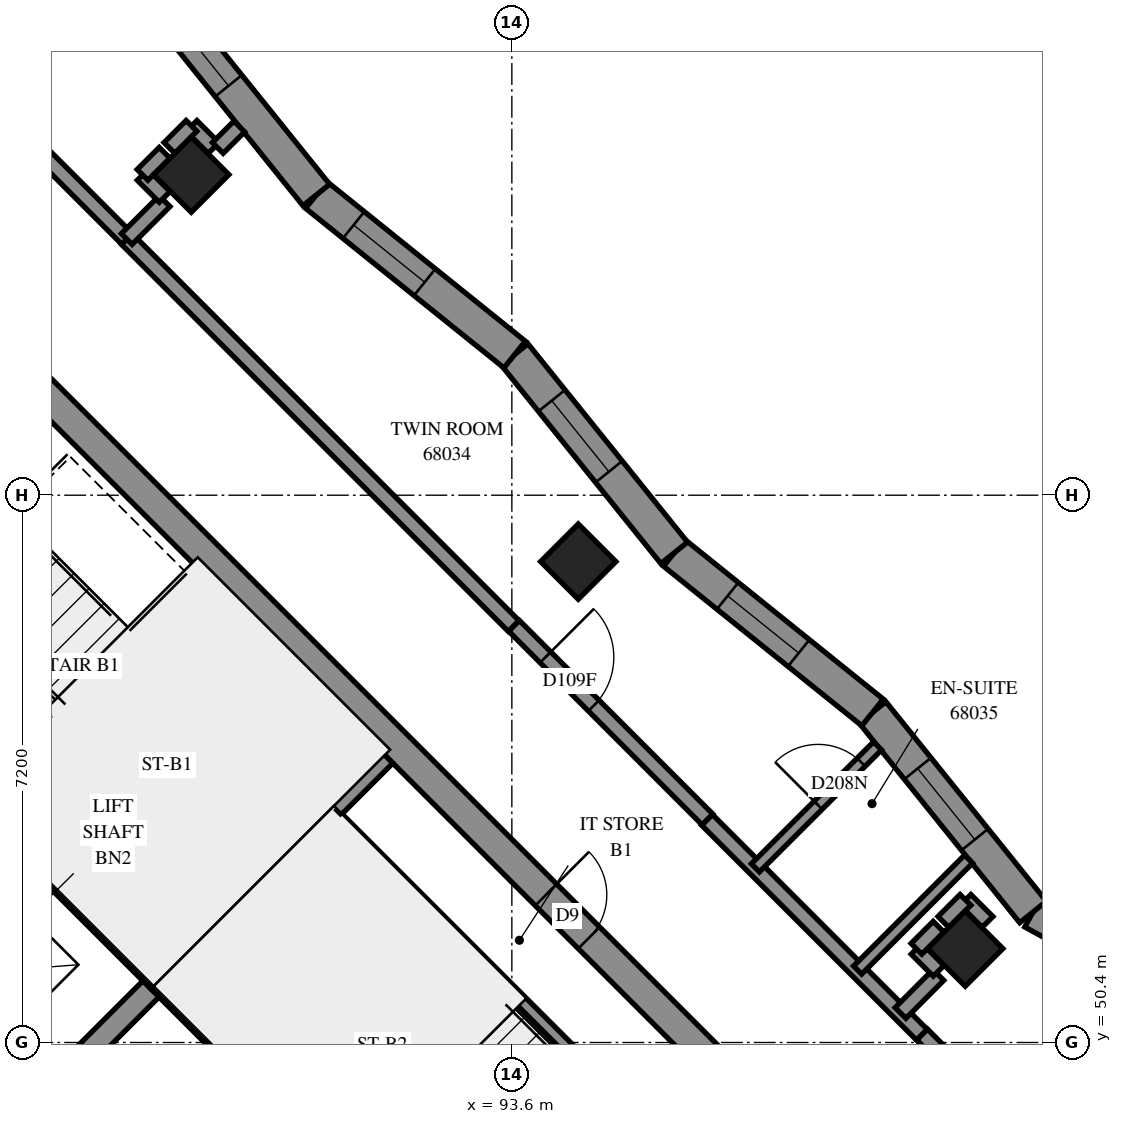
"""IFC4 building model, lengths in metres.
Left out: names, types, materials, properties, quantities, classifications, styles, units other than length and angle.
Written with IfcOpenShell. Run it as: python <this file> out.ifc"""

import sys

from ifc_helpers import new_model, si_unit, direction, frame, frame_2d, origin, origin_2d, place, context, subcontext, project, spatial, polyline, rectangle, outline, extrude, element, fill, save


model = new_model("IFC4")
c1 = context("Model", 3, precision=1e-05, world=origin(), true_north=direction((0.0, 1.0)))
c2 = subcontext(c1, "Body", "Model", "MODEL_VIEW")
j1 = project(units=[si_unit("LENGTHUNIT", "METRE"), si_unit("PLANEANGLEUNIT", "RADIAN")], contexts=[c1])
p1 = place(None, origin())
s1 = spatial("IfcSite", under=j1, at=p1, CompositionType="ELEMENT")
p2 = place(p1, origin())
s2 = spatial("IfcBuilding", under=s1, at=p2, CompositionType="ELEMENT")
p3 = place(p2, frame((0.0, 0.0, 250.6)))
s3 = spatial("IfcBuildingStorey", under=s2, at=p3, CompositionType="ELEMENT", Elevation=250.6)
for number, where, z_axis, x_axis in (
    (1, (89.382, 61.818, 0.0), (0.0, 0.0, 1.0), (0.707, -0.707, 0.0)),
    (2, (94.474, 56.727, 0.0), (0.0, 0.0, 1.0), (0.707, -0.707, 0.0)),
    (3, (99.565, 51.635, 0.0), (0.0, 0.0, 1.0), (0.707, -0.707, 0.0)),
):
    element("IfcColumn", number, at=place(p3, frame(where, z_axis=z_axis, x_axis=x_axis)), inside=s3, PredefinedType="COLUMN", context=c2, shape_type="SweptSolid", body=[
        extrude(rectangle(XDim=0.7, YDim=0.7, at=origin_2d()), origin(), (0.0, 0.0, 1.0), 3.1),
    ])
p4 = place(p3, frame((86.695, 59.696, -0.3), z_axis=(0.0, 0.0, 1.0), x_axis=(0.7071100706, -0.7071034917, 0.0)))
e4 = element("IfcWall", 4, at=p4, inside=s3, PredefinedType="SHEAR", context=c2, shape_type="SweptSolid", body=[
    extrude(rectangle(XDim=15.2, YDim=0.4, at=frame_2d((7.6, 0.0))), origin(), (0.0, 0.0, 1.0), 2.7),
])
p5 = place(p4, frame((10.4, 0.0, 0.3)))
e5 = element("IfcOpeningElement", 5, at=p5, cuts=e4, PredefinedType="OPENING", context=c2, shape_type="SweptSolid", body=[
    extrude(rectangle(XDim=0.8, YDim=2.1, at=frame_2d((0.4, 1.05))), frame((0.0, 0.21, 0.0), z_axis=(0.0, -1.0, 0.0), x_axis=(1.0, 0.0, 0.0)), (0.0, 0.0, 1.0), 0.42),
])
p6 = place(p3, frame((86.625, 48.878, 0.0), z_axis=(0.0, 0.0, 1.0), x_axis=(0.7071067812, 0.7071067812, 0.0)))
e6 = element("IfcWall", 6, at=p6, inside=s3, PredefinedType="SOLIDWALL", context=c2, shape_type="SweptSolid", body=[
    extrude(rectangle(XDim=3.3, YDim=0.3, at=frame_2d((1.65, 0.0))), origin(), (0.0, 0.0, 1.0), 3.1),
])
p7 = place(p3, frame((78.988, 51.423, 0.0), z_axis=(0.0, 0.0, 1.0), x_axis=(0.7071067812, -0.7071067812, 0.0)))
e7 = element("IfcWall", 7, at=p7, inside=s3, PredefinedType="SOLIDWALL", context=c2, shape_type="SweptSolid", body=[
    extrude(rectangle(XDim=14.4, YDim=0.3, at=frame_2d((7.2, 0.0))), origin(), (0.0, 0.0, 1.0), 3.1),
])
p8 = place(p7, frame((1.35, 0.0, 0.0)))
e8 = element("IfcOpeningElement", 8, at=p8, cuts=e7, PredefinedType="OPENING", context=c2, shape_type="SweptSolid", body=[
    extrude(rectangle(XDim=0.9, YDim=2.1, at=frame_2d((0.45, 1.05))), frame((0.0, 0.16, 0.0), z_axis=(0.0, -1.0, 0.0), x_axis=(1.0, 0.0, 0.0)), (0.0, 0.0, 1.0), 0.32),
])
p9 = place(p7, frame((4.95, 0.0, 0.0)))
e9 = element("IfcOpeningElement", 9, at=p9, cuts=e7, PredefinedType="OPENING", context=c2, shape_type="SweptSolid", body=[
    extrude(rectangle(XDim=0.9, YDim=2.1, at=frame_2d((0.45, 1.05))), frame((0.0, 0.16, 0.0), z_axis=(0.0, -1.0, 0.0), x_axis=(1.0, 0.0, 0.0)), (0.0, 0.0, 1.0), 0.32),
])
p10 = place(p7, frame((8.55, 0.0, 0.0)))
e10 = element("IfcOpeningElement", 10, at=p10, cuts=e7, PredefinedType="OPENING", context=c2, shape_type="SweptSolid", body=[
    extrude(rectangle(XDim=0.9, YDim=2.1, at=frame_2d((0.45, 1.05))), frame((0.0, 0.16, 0.0), z_axis=(0.0, -1.0, 0.0), x_axis=(1.0, 0.0, 0.0)), (0.0, 0.0, 1.0), 0.32),
])
p11 = place(p7, frame((12.05, 0.0, 0.0)))
e11 = element("IfcOpeningElement", 11, at=p11, cuts=e7, PredefinedType="OPENING", context=c2, shape_type="SweptSolid", body=[
    extrude(rectangle(XDim=1.1, YDim=2.1, at=frame_2d((0.55, 1.05))), frame((0.0, 0.16, 0.0), z_axis=(0.0, -1.0, 0.0), x_axis=(1.0, 0.0, 0.0)), (0.0, 0.0, 1.0), 0.32),
])
p12 = place(p3, frame((81.534, 53.969, 0.0), z_axis=(0.0, 0.0, 1.0), x_axis=(0.707103309, -0.7071102534, 0.0)))
e12 = element("IfcWall", 12, at=p12, inside=s3, PredefinedType="SOLIDWALL", context=c2, shape_type="SweptSolid", body=[
    extrude(rectangle(XDim=14.4, YDim=0.3, at=frame_2d((7.2, 0.0))), origin(), (0.0, 0.0, 1.0), 3.1),
])
p13 = place(p12, frame((8.55, 0.0, 0.0)))
e13 = element("IfcOpeningElement", 13, at=p13, cuts=e12, PredefinedType="OPENING", context=c2, shape_type="SweptSolid", body=[
    extrude(rectangle(XDim=0.9, YDim=2.1, at=frame_2d((0.45, 1.05))), frame((0.0, 0.16, 0.0), z_axis=(0.0, -1.0, 0.0), x_axis=(1.0, 0.0, 0.0)), (0.0, 0.0, 1.0), 0.32),
])
p14 = place(p12, frame((1.25, 0.0, 0.0)))
e14 = element("IfcOpeningElement", 14, at=p14, cuts=e12, PredefinedType="OPENING", context=c2, shape_type="SweptSolid", body=[
    extrude(rectangle(XDim=1.1, YDim=2.1, at=frame_2d((0.55, 1.05))), frame((0.0, 0.16, 0.0), z_axis=(0.0, -1.0, 0.0), x_axis=(1.0, 0.0, 0.0)), (0.0, 0.0, 1.0), 0.32),
])
p15 = place(p12, frame((4.85, 0.0, 0.0)))
e15 = element("IfcOpeningElement", 15, at=p15, cuts=e12, PredefinedType="OPENING", context=c2, shape_type="SweptSolid", body=[
    extrude(rectangle(XDim=1.1, YDim=2.1, at=frame_2d((0.55, 1.05))), frame((0.0, 0.16, 0.0), z_axis=(0.0, -1.0, 0.0), x_axis=(1.0, 0.0, 0.0)), (0.0, 0.0, 1.0), 0.32),
])
p16 = place(p12, frame((12.05, 0.0, 0.0)))
e16 = element("IfcOpeningElement", 16, at=p16, cuts=e12, PredefinedType="OPENING", context=c2, shape_type="SweptSolid", body=[
    extrude(rectangle(XDim=1.1, YDim=2.1, at=frame_2d((0.55, 1.05))), frame((0.0, 0.16, 0.0), z_axis=(0.0, -1.0, 0.0), x_axis=(1.0, 0.0, 0.0)), (0.0, 0.0, 1.0), 0.32),
])
for number, where, z_axis, x_axis in (
    (17, (83.867, 56.302, 0.0), (0.0, 0.0, 1.0), (0.707, -0.707, 0.0)),
    (18, (88.958, 51.211, 0.0), (0.0, 0.0, 1.0), (0.707, -0.707, 0.0)),
):
    element("IfcWall", number, at=place(p3, frame(where, z_axis=z_axis, x_axis=x_axis)), inside=s3, PredefinedType="SOLIDWALL", context=c2, shape_type="SweptSolid", body=[
        extrude(rectangle(XDim=7.2, YDim=0.3, at=frame_2d((3.6, 0.0))), origin(), (0.0, 0.0, 1.0), 3.1),
    ])
p17 = place(p3, frame((88.958, 51.211, 0.0), z_axis=(0.0, 0.0, 1.0), x_axis=(0.7071067812, 0.7071067812, 0.0)))
e19 = element("IfcWall", 19, at=p17, inside=s3, PredefinedType="SOLIDWALL", context=c2, shape_type="SweptSolid", body=[
    extrude(rectangle(XDim=4.2, YDim=0.3, at=frame_2d((2.1, 0.0))), origin(), (0.0, 0.0, 1.0), 3.1),
])
p18 = place(p3, frame((99.246, 46.544, 0.0), z_axis=(0.0, 0.0, 1.0), x_axis=(0.7071067812, 0.7071067812, 0.0)))
e20 = element("IfcWall", 20, at=p18, inside=s3, PredefinedType="SOLIDWALL", context=c2, shape_type="SweptSolid", body=[
    extrude(outline(polyline([(0.225, -0.225), (5.986, -0.225), (5.388, 0.225), (-0.225, 0.225), (0.225, -0.225)])), origin(), (0.0, 0.0, 1.0), 3.1),
])
p19 = place(p18, frame((0.713, 0.0, 0.6)))
e21 = element("IfcOpeningElement", 21, at=p19, cuts=e20, PredefinedType="OPENING", context=c2, shape_type="SweptSolid", body=[
    extrude(rectangle(XDim=1.8, YDim=1.9, at=frame_2d((0.9, 0.95))), frame((0.0, 0.235, 0.0), z_axis=(0.0, -1.0, 0.0), x_axis=(1.0, 0.0, 0.0)), (0.0, 0.0, 1.0), 0.47),
])
p20 = place(p3, frame((103.268, 50.565, 0.0), z_axis=(0.0, 0.0, 1.0), x_axis=(-0.8754572741, 0.4832955216, 0.0)))
e22 = element("IfcWall", 22, at=p20, inside=s3, PredefinedType="SOLIDWALL", context=c2, shape_type="SweptSolid", body=[
    extrude(outline(polyline([(-0.299, -0.225), (3.166, -0.225), (3.255, 0.225), (0.299, 0.225), (-0.299, -0.225)])), origin(), (0.0, 0.0, 1.0), 3.1),
])
p21 = place(p20, frame((1.155, 0.0, 0.45)))
e23 = element("IfcOpeningElement", 23, at=p21, cuts=e22, PredefinedType="OPENING", context=c2, shape_type="SweptSolid", body=[
    extrude(rectangle(XDim=1.2, YDim=2.55, at=frame_2d((0.6, 1.275))), frame((0.0, 0.235, 0.0), z_axis=(0.0, -1.0, 0.0), x_axis=(1.0, 0.0, 0.0)), (0.0, 0.0, 1.0), 0.47),
])
p22 = place(p3, frame((100.457, 52.117, 0.0), z_axis=(0.0, 0.0, 1.0), x_axis=(-0.6267598202, 0.7792125049, 0.0)))
e24 = element("IfcWall", 24, at=p22, inside=s3, PredefinedType="SOLIDWALL", context=c2, shape_type="SweptSolid", body=[
    extrude(outline(polyline([(0.044, -0.225), (3.393, -0.225), (3.345, 0.225), (-0.044, 0.225), (0.044, -0.225)])), origin(), (0.0, 0.0, 1.0), 3.1),
])
p23 = place(p22, frame((1.222, 0.0, 0.45)))
e25 = element("IfcOpeningElement", 25, at=p23, cuts=e24, PredefinedType="OPENING", context=c2, shape_type="SweptSolid", body=[
    extrude(rectangle(XDim=1.2, YDim=2.55, at=frame_2d((0.6, 1.275))), frame((0.0, 0.235, 0.0), z_axis=(0.0, -1.0, 0.0), x_axis=(1.0, 0.0, 0.0)), (0.0, 0.0, 1.0), 0.47),
])
p24 = place(p3, frame((98.345, 54.742, 0.0), z_axis=(0.0, 0.0, 1.0), x_axis=(-0.7792172545, 0.6267539152, 0.0)))
e26 = element("IfcWall", 26, at=p24, inside=s3, PredefinedType="SOLIDWALL", context=c2, shape_type="SweptSolid", body=[
    extrude(outline(polyline([(-0.024, -0.225), (3.325, -0.225), (3.373, 0.225), (0.024, 0.225), (-0.024, -0.225)])), origin(), (0.0, 0.0, 1.0), 3.1),
])
p25 = place(p24, frame((1.247, 0.0, 0.45)))
e27 = element("IfcOpeningElement", 27, at=p25, cuts=e26, PredefinedType="OPENING", context=c2, shape_type="SweptSolid", body=[
    extrude(rectangle(XDim=1.2, YDim=2.55, at=frame_2d((0.6, 1.275))), frame((0.0, 0.235, 0.0), z_axis=(0.0, -1.0, 0.0), x_axis=(1.0, 0.0, 0.0)), (0.0, 0.0, 1.0), 0.47),
])
p26 = place(p3, frame((95.736, 56.841, 0.0), z_axis=(0.0, 0.0, 1.0), x_axis=(-0.6267539152, 0.7792172545, 0.0)))
e28 = element("IfcWall", 28, at=p26, inside=s3, PredefinedType="SOLIDWALL", context=c2, shape_type="SweptSolid", body=[
    extrude(outline(polyline([(0.024, -0.225), (3.373, -0.225), (3.325, 0.225), (-0.024, 0.225), (0.024, -0.225)])), origin(), (0.0, 0.0, 1.0), 3.1),
])
p27 = place(p26, frame((1.37, 0.0, 0.45)))
e29 = element("IfcOpeningElement", 29, at=p27, cuts=e28, PredefinedType="OPENING", context=c2, shape_type="SweptSolid", body=[
    extrude(rectangle(XDim=1.2, YDim=2.55, at=frame_2d((0.6, 1.275))), frame((0.0, 0.235, 0.0), z_axis=(0.0, -1.0, 0.0), x_axis=(1.0, 0.0, 0.0)), (0.0, 0.0, 1.0), 0.47),
])
p28 = place(p3, frame((93.637, 59.451, 0.0), z_axis=(0.0, 0.0, 1.0), x_axis=(-0.7792026718, 0.6267720449, 0.0)))
e30 = element("IfcWall", 30, at=p28, inside=s3, PredefinedType="SOLIDWALL", context=c2, shape_type="SweptSolid", body=[
    extrude(outline(polyline([(-0.024, -0.225), (3.325, -0.225), (3.373, 0.225), (0.024, 0.225), (-0.024, -0.225)])), origin(), (0.0, 0.0, 1.0), 3.1),
])
p29 = place(p28, frame((1.519, 0.0, 0.45)))
e31 = element("IfcOpeningElement", 31, at=p29, cuts=e30, PredefinedType="OPENING", context=c2, shape_type="SweptSolid", body=[
    extrude(rectangle(XDim=1.2, YDim=2.55, at=frame_2d((0.6, 1.275))), frame((0.0, 0.235, 0.0), z_axis=(0.0, -1.0, 0.0), x_axis=(1.0, 0.0, 0.0)), (0.0, 0.0, 1.0), 0.47),
])
p30 = place(p3, frame((91.027, 61.55, 0.0), z_axis=(0.0, 0.0, 1.0), x_axis=(-0.6267866278, 0.7791909414, 0.0)))
e32 = element("IfcWall", 32, at=p30, inside=s3, PredefinedType="SOLIDWALL", context=c2, shape_type="SweptSolid", body=[
    extrude(outline(polyline([(0.024, -0.225), (3.373, -0.225), (3.325, 0.225), (-0.024, 0.225), (0.024, -0.225)])), origin(), (0.0, 0.0, 1.0), 3.1),
])
p31 = place(p30, frame((1.843, 0.0, 0.45)))
e33 = element("IfcOpeningElement", 33, at=p31, cuts=e32, PredefinedType="OPENING", context=c2, shape_type="SweptSolid", body=[
    extrude(rectangle(XDim=1.2, YDim=2.55, at=frame_2d((0.6, 1.275))), frame((0.0, 0.235, 0.0), z_axis=(0.0, -1.0, 0.0), x_axis=(1.0, 0.0, 0.0)), (0.0, 0.0, 1.0), 0.47),
])
p32 = place(p3, frame((91.313, 53.354, 0.0), z_axis=(0.0, 0.0, 1.0), x_axis=(0.7071067812, -0.7071067812, 0.0)))
e34 = element("IfcWall", 34, at=p32, inside=s3, PredefinedType="PARTITIONING", context=c2, shape_type="SweptSolid", body=[
    extrude(rectangle(XDim=5.65, YDim=0.15, at=frame_2d((2.825, 0.0))), origin(), (0.0, 0.0, 1.0), 3.1),
])
p33 = place(p3, frame((88.535, 60.971, 0.0), z_axis=(0.0, 0.0, 1.0), x_axis=(0.7069678741, -0.707245661, 0.0)))
e35 = element("IfcWall", 35, at=p33, inside=s3, PredefinedType="PARTITIONING", context=c2, shape_type="SweptSolid", body=[
    extrude(rectangle(XDim=7.2, YDim=0.2, at=frame_2d((3.6, 0.0))), origin(), (0.0, 0.0, 1.0), 3.1),
])
p34 = place(p3, frame((96.167, 53.329, 0.0), z_axis=(0.0, 0.0, 1.0), x_axis=(0.7071067812, -0.7071067812, 0.0)))
e36 = element("IfcWall", 36, at=p34, inside=s3, PredefinedType="PARTITIONING", context=c2, shape_type="SweptSolid", body=[
    extrude(rectangle(XDim=3.999, YDim=0.2, at=frame_2d((2.0, 0.0))), origin(), (0.0, 0.0, 1.0), 3.1),
])
p35 = place(p3, frame((93.629, 55.881, 0.0), z_axis=(0.0, 0.0, 1.0), x_axis=(0.7068288851, -0.7073845681, 0.0)))
e37 = element("IfcWall", 37, at=p35, inside=s3, PredefinedType="PARTITIONING", context=c2, shape_type="SweptSolid", body=[
    extrude(rectangle(XDim=3.599, YDim=0.2, at=frame_2d((1.8, 0.0))), origin(), (0.0, 0.0, 1.0), 3.1),
])
p36 = place(p35, frame((0.584, 0.0, 0.0)))
e38 = element("IfcOpeningElement", 38, at=p36, cuts=e37, PredefinedType="OPENING", context=c2, shape_type="SweptSolid", body=[
    extrude(rectangle(XDim=0.9, YDim=2.1, at=frame_2d((0.45, 1.05))), frame((0.0, 0.11, 0.0), z_axis=(0.0, -1.0, 0.0), x_axis=(1.0, 0.0, 0.0)), (0.0, 0.0, 1.0), 0.22),
])
p37 = place(p3, frame((86.841, 62.669, 0.0), z_axis=(0.0, 0.0, 1.0), x_axis=(0.7071067812, -0.7071067812, 0.0)))
e39 = element("IfcWall", 39, at=p37, inside=s3, PredefinedType="PARTITIONING", context=c2, shape_type="SweptSolid", body=[
    extrude(rectangle(XDim=2.398, YDim=0.2, at=frame_2d((1.199, 0.0))), origin(), (0.0, 0.0, 1.0), 3.1),
])
p38 = place(p3, frame((96.804, 52.698, 0.0), z_axis=(0.0, 0.0, 1.0), x_axis=(0.7075691222, 0.7066441377, 0.0)))
e40 = element("IfcWall", 40, at=p38, inside=s3, PredefinedType="PARTITIONING", context=c2, shape_type="SweptSolid", body=[
    extrude(rectangle(XDim=2.27, YDim=0.15, at=frame_2d((1.135, 0.0))), origin(), (0.0, 0.0, 1.0), 3.1),
])
p39 = place(p38, frame((1.166, 0.0, 0.0)))
e41 = element("IfcOpeningElement", 41, at=p39, cuts=e40, PredefinedType="OPENING", context=c2, shape_type="SweptSolid", body=[
    extrude(rectangle(XDim=0.8, YDim=2.1, at=frame_2d((0.4, 1.05))), frame((0.0, 0.085, 0.0), z_axis=(0.0, -1.0, 0.0), x_axis=(1.0, 0.0, 0.0)), (0.0, 0.0, 1.0), 0.17),
])
p40 = place(p3, frame((98.149, 51.353, 0.0), z_axis=(0.0, 0.0, 1.0), x_axis=(0.707082559, 0.7071310026, 0.0)))
e42 = element("IfcWall", 42, at=p40, inside=s3, PredefinedType="PARTITIONING", context=c2, shape_type="SweptSolid", body=[
    extrude(rectangle(XDim=2.064, YDim=0.15, at=frame_2d((1.032, 0.0))), origin(), (0.0, 0.0, 1.0), 3.1),
])
p41 = place(p3, frame((98.998, 50.504, 0.0), z_axis=(0.0, 0.0, 1.0), x_axis=(0.7076063266, -0.7066068826, 0.0)))
e43 = element("IfcWall", 43, at=p41, inside=s3, PredefinedType="PARTITIONING", context=c2, shape_type="SweptSolid", body=[
    extrude(rectangle(XDim=2.001, YDim=0.2, at=frame_2d((1.001, 0.0))), origin(), (0.0, 0.0, 1.0), 3.1),
])
p42 = place(p3, frame((98.714, 50.788, 0.0), z_axis=(0.0, 0.0, 1.0), x_axis=(0.7056883165, 0.7085224061, 0.0)))
e44 = element("IfcWall", 44, at=p42, inside=s3, PredefinedType="PARTITIONING", context=c2, shape_type="SweptSolid", body=[
    extrude(rectangle(XDim=0.706, YDim=0.2, at=frame_2d((0.353, 0.0))), origin(), (0.0, 0.0, 1.0), 3.1),
])
p43 = place(p3, frame((88.534, 60.971, 0.0), z_axis=(0.0, 0.0, 1.0), x_axis=(0.7071067812, 0.7071067812, 0.0)))
e45 = element("IfcWall", 45, at=p43, inside=s3, PredefinedType="PARTITIONING", context=c2, shape_type="SweptSolid", body=[
    extrude(rectangle(XDim=0.704, YDim=0.2, at=frame_2d((0.352, 0.0))), origin(), (0.0, 0.0, 1.0), 3.1),
])
for number, where, z_axis, x_axis in (
    (46, (88.743, 61.815, 0.0), (0.0, 0.0, 1.0), (0.707, -0.707, 0.0)),
    (47, (89.386, 62.458, 0.0), (0.0, 0.0, 1.0), (0.707, -0.707, 0.0)),
    (48, (88.741, 61.815, 0.0), (0.0, 0.0, 1.0), (0.707, 0.707, 0.0)),
    (49, (89.095, 62.169, 0.0), (0.0, 0.0, 1.0), (0.707, 0.707, 0.0)),
    (50, (99.568, 52.276, 0.0), (0.0, 0.0, 1.0), (0.707, -0.707, 0.0)),
    (51, (99.278, 51.986, 0.0), (0.0, 0.0, 1.0), (0.707, 0.707, 0.0)),
    (52, (98.925, 51.633, 0.0), (0.0, 0.0, 1.0), (0.707, -0.707, 0.0)),
    (53, (98.924, 51.632, 0.0), (0.0, 0.0, 1.0), (0.707, 0.707, 0.0)),
):
    element("IfcWall", number, at=place(p3, frame(where, z_axis=z_axis, x_axis=x_axis)), inside=s3, PredefinedType="PARTITIONING", context=c2, shape_type="SweptSolid", body=[
        extrude(rectangle(XDim=0.41, YDim=0.2, at=frame_2d((0.205, 0.0))), origin(), (0.0, 0.0, 1.0), 3.1),
    ])
p44 = place(p3, frame((89.731, 62.169, 0.0), z_axis=(0.0, 0.0, 1.0), x_axis=(0.7071067812, 0.7071067812, 0.0)))
e54 = element("IfcWall", 54, at=p44, inside=s3, PredefinedType="PARTITIONING", context=c2, shape_type="SweptSolid", body=[
    extrude(rectangle(XDim=0.399, YDim=0.2, at=frame_2d((0.2, 0.0))), origin(), (0.0, 0.0, 1.0), 3.1),
])
p45 = place(p23, origin())
e55 = element("IfcWindow", 55, at=p45, inside=s3, PartitioningType="SINGLE_PANEL", PredefinedType="WINDOW", context=c2, shape_type="SweptSolid", body=[
    extrude(rectangle(XDim=1.2, YDim=2.55, at=frame_2d((0.6, 1.275))), frame((0.0, 0.205, 0.0), z_axis=(0.0, -1.0, 0.0), x_axis=(1.0, 0.0, 0.0)), (0.0, 0.0, 1.0), 0.06),
])
fill(e25, e55)
p46 = place(p25, origin())
e56 = element("IfcWindow", 56, at=p46, inside=s3, PartitioningType="SINGLE_PANEL", PredefinedType="WINDOW", context=c2, shape_type="SweptSolid", body=[
    extrude(rectangle(XDim=1.2, YDim=2.55, at=frame_2d((0.6, 1.275))), frame((0.0, 0.205, 0.0), z_axis=(0.0, -1.0, 0.0), x_axis=(1.0, 0.0, 0.0)), (0.0, 0.0, 1.0), 0.06),
])
fill(e27, e56)
p47 = place(p27, origin())
e57 = element("IfcWindow", 57, at=p47, inside=s3, PartitioningType="SINGLE_PANEL", PredefinedType="WINDOW", context=c2, shape_type="SweptSolid", body=[
    extrude(rectangle(XDim=1.2, YDim=2.55, at=frame_2d((0.6, 1.275))), frame((0.0, 0.205, 0.0), z_axis=(0.0, -1.0, 0.0), x_axis=(1.0, 0.0, 0.0)), (0.0, 0.0, 1.0), 0.06),
])
fill(e29, e57)
p48 = place(p29, origin())
e58 = element("IfcWindow", 58, at=p48, inside=s3, PartitioningType="SINGLE_PANEL", PredefinedType="WINDOW", context=c2, shape_type="SweptSolid", body=[
    extrude(rectangle(XDim=1.2, YDim=2.55, at=frame_2d((0.6, 1.275))), frame((0.0, 0.205, 0.0), z_axis=(0.0, -1.0, 0.0), x_axis=(1.0, 0.0, 0.0)), (0.0, 0.0, 1.0), 0.06),
])
fill(e31, e58)
p49 = place(p31, origin())
e59 = element("IfcWindow", 59, at=p49, inside=s3, PartitioningType="SINGLE_PANEL", PredefinedType="WINDOW", context=c2, shape_type="SweptSolid", body=[
    extrude(rectangle(XDim=1.2, YDim=2.55, at=frame_2d((0.6, 1.275))), frame((0.0, 0.205, 0.0), z_axis=(0.0, -1.0, 0.0), x_axis=(1.0, 0.0, 0.0)), (0.0, 0.0, 1.0), 0.06),
])
fill(e33, e59)
p50 = place(p5, origin())
e60 = element("IfcDoor", 60, at=p50, inside=s3, OperationType="SINGLE_SWING_RIGHT", PredefinedType="DOOR", context=c2, shape_type="SweptSolid", body=[
    extrude(rectangle(XDim=0.8, YDim=2.1, at=frame_2d((0.4, 1.05))), frame((0.0, 0.025, 0.0), z_axis=(0.0, -1.0, 0.0), x_axis=(1.0, 0.0, 0.0)), (0.0, 0.0, 1.0), 0.05),
])
fill(e5, e60)
p51 = place(p36, origin())
e61 = element("IfcDoor", 61, at=p51, inside=s3, OperationType="SINGLE_SWING_LEFT", PredefinedType="DOOR", context=c2, shape_type="SweptSolid", body=[
    extrude(rectangle(XDim=0.9, YDim=2.1, at=frame_2d((0.45, 1.05))), frame((0.0, 0.025, 0.0), z_axis=(0.0, -1.0, 0.0), x_axis=(1.0, 0.0, 0.0)), (0.0, 0.0, 1.0), 0.05),
])
fill(e38, e61)
p52 = place(p39, origin())
e62 = element("IfcDoor", 62, at=p52, inside=s3, OperationType="SINGLE_SWING_RIGHT", PredefinedType="DOOR", context=c2, shape_type="SweptSolid", body=[
    extrude(rectangle(XDim=0.8, YDim=2.1, at=frame_2d((0.4, 1.05))), frame((0.0, 0.025, 0.0), z_axis=(0.0, -1.0, 0.0), x_axis=(1.0, 0.0, 0.0)), (0.0, 0.0, 1.0), 0.05),
])
fill(e41, e62)
save(model, sys.argv[1])
